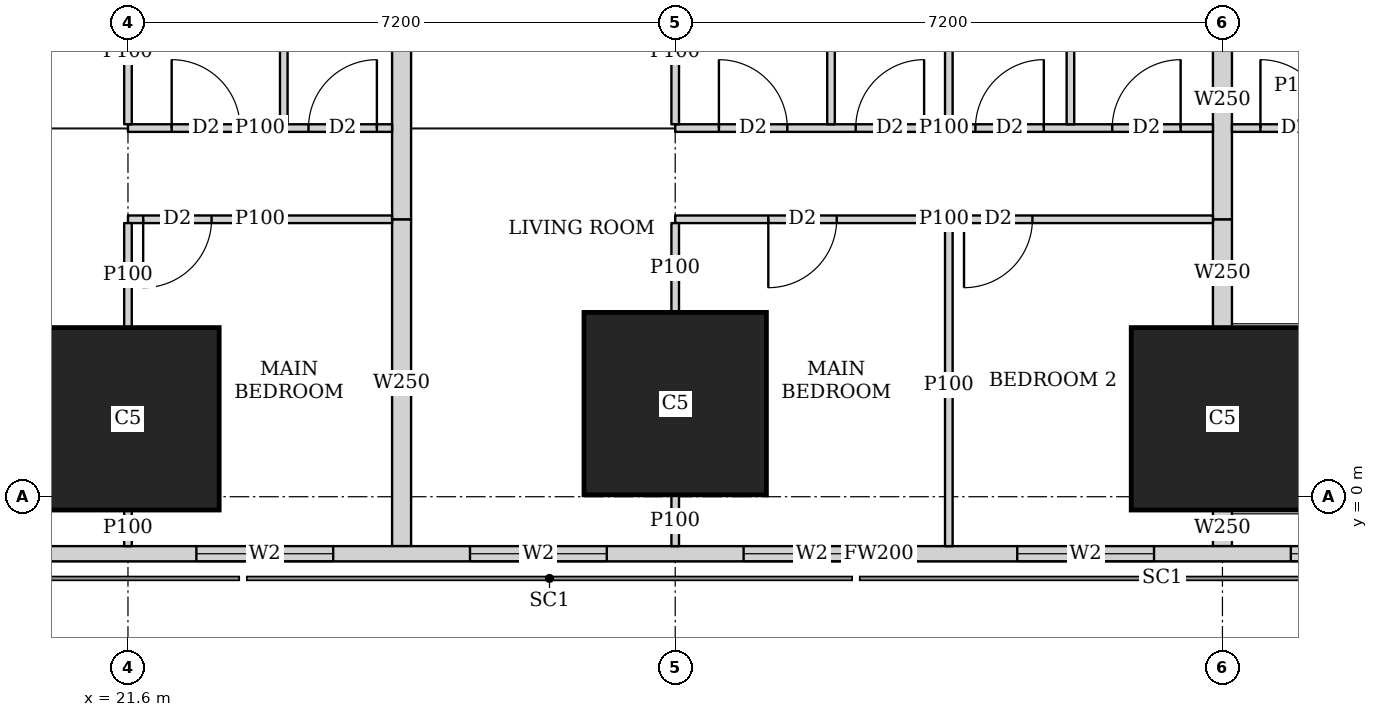
"""IFC4 building model, lengths in metres.
Left out: names, types, materials, properties, quantities, classifications, styles, units other than length and angle.
Written with IfcOpenShell. Run it as: python <this file> out.ifc"""

import sys

from ifc_helpers import new_model, si_unit, direction, frame, frame_2d, origin, origin_2d, place, context, subcontext, project, spatial, rectangle, extrude, element, fill, save


model = new_model("IFC4")
c1 = context("Model", 3, precision=1e-05, world=origin(), true_north=direction((0.0, 1.0)))
c2 = subcontext(c1, "Body", "Model", "MODEL_VIEW")
j1 = project(units=[si_unit("LENGTHUNIT", "METRE"), si_unit("PLANEANGLEUNIT", "RADIAN")], contexts=[c1])
p1 = place(None, origin())
s1 = spatial("IfcSite", under=j1, at=p1, CompositionType="ELEMENT")
p2 = place(p1, origin())
s2 = spatial("IfcBuilding", under=s1, at=p2, CompositionType="ELEMENT")
p3 = place(p2, frame((0.0, 0.0, 227.45)))
s3 = spatial("IfcBuildingStorey", under=s2, at=p3, CompositionType="ELEMENT", Elevation=227.45)
for number, where, z_axis, x_axis in (
    (1, (21.6, 1.025, 0.0), (0.0, 0.0, 1.0), (1.0, 0.0, 0.0)),
    (2, (28.8, 1.225, 0.0), (0.0, 0.0, 1.0), (1.0, 0.0, 0.0)),
    (3, (36.0, 1.025, 0.0), (0.0, 0.0, 1.0), (1.0, 0.0, 0.0)),
):
    element("IfcColumn", number, at=place(p3, frame(where, z_axis=z_axis, x_axis=x_axis)), inside=s3, PredefinedType="COLUMN", context=c2, shape_type="SweptSolid", body=[
        extrude(rectangle(XDim=2.4, YDim=2.4, at=origin_2d()), origin(), (0.0, 0.0, 1.0), 3.75),
    ])
p4 = place(p3, frame((14.563, -0.75, 0.0), z_axis=(0.0, 0.0, 1.0), x_axis=(1.0, 0.0, 0.0)))
e4 = element("IfcWall", 4, at=p4, inside=s3, PredefinedType="SOLIDWALL", context=c2, shape_type="SweptSolid", body=[
    extrude(rectangle(XDim=33.228, YDim=0.2, at=frame_2d((16.614, 0.0))), origin(), (0.0, 0.0, 1.0), 3.5),
])
p5 = place(p4, frame((2.319, 0.0, 0.9)))
e5 = element("IfcOpeningElement", 5, at=p5, cuts=e4, PredefinedType="OPENING", context=c2, shape_type="SweptSolid", body=[
    extrude(rectangle(XDim=2.4, YDim=1.5, at=frame_2d((1.2, 0.75))), frame((0.0, 0.11, 0.0), z_axis=(0.0, -1.0, 0.0), x_axis=(1.0, 0.0, 0.0)), (0.0, 0.0, 1.0), 0.22),
])
p6 = place(p4, frame((7.937, 0.0, 0.9)))
e6 = element("IfcOpeningElement", 6, at=p6, cuts=e4, PredefinedType="OPENING", context=c2, shape_type="SweptSolid", body=[
    extrude(rectangle(XDim=1.8, YDim=1.5, at=frame_2d((0.9, 0.75))), frame((0.0, 0.11, 0.0), z_axis=(0.0, -1.0, 0.0), x_axis=(1.0, 0.0, 0.0)), (0.0, 0.0, 1.0), 0.22),
])
p7 = place(p4, frame((11.537, 0.0, 0.9)))
e7 = element("IfcOpeningElement", 7, at=p7, cuts=e4, PredefinedType="OPENING", context=c2, shape_type="SweptSolid", body=[
    extrude(rectangle(XDim=1.8, YDim=1.5, at=frame_2d((0.9, 0.75))), frame((0.0, 0.11, 0.0), z_axis=(0.0, -1.0, 0.0), x_axis=(1.0, 0.0, 0.0)), (0.0, 0.0, 1.0), 0.22),
])
p8 = place(p4, frame((15.137, 0.0, 0.9)))
e8 = element("IfcOpeningElement", 8, at=p8, cuts=e4, PredefinedType="OPENING", context=c2, shape_type="SweptSolid", body=[
    extrude(rectangle(XDim=1.8, YDim=1.5, at=frame_2d((0.9, 0.75))), frame((0.0, 0.11, 0.0), z_axis=(0.0, -1.0, 0.0), x_axis=(1.0, 0.0, 0.0)), (0.0, 0.0, 1.0), 0.22),
])
p9 = place(p4, frame((18.737, 0.0, 0.9)))
e9 = element("IfcOpeningElement", 9, at=p9, cuts=e4, PredefinedType="OPENING", context=c2, shape_type="SweptSolid", body=[
    extrude(rectangle(XDim=1.8, YDim=1.5, at=frame_2d((0.9, 0.75))), frame((0.0, 0.11, 0.0), z_axis=(0.0, -1.0, 0.0), x_axis=(1.0, 0.0, 0.0)), (0.0, 0.0, 1.0), 0.22),
])
p10 = place(p4, frame((22.337, 0.0, 0.9)))
e10 = element("IfcOpeningElement", 10, at=p10, cuts=e4, PredefinedType="OPENING", context=c2, shape_type="SweptSolid", body=[
    extrude(rectangle(XDim=1.8, YDim=1.5, at=frame_2d((0.9, 0.75))), frame((0.0, 0.11, 0.0), z_axis=(0.0, -1.0, 0.0), x_axis=(1.0, 0.0, 0.0)), (0.0, 0.0, 1.0), 0.22),
])
p11 = place(p3, frame((33.68, 42.723, 0.0), z_axis=(0.0, 0.0, 1.0), x_axis=(0.185601160014, -0.982625162207, 0.0)))
e11 = element("IfcWall", 11, at=p11, inside=s3, PredefinedType="SOLIDWALL", context=c2, shape_type="SweptSolid", body=[
    extrude(rectangle(XDim=41.051, YDim=0.15, at=frame_2d((20.526, 0.0))), origin(), (0.0, 0.0, 1.0), 2.5),
])
p12 = place(p11, frame((16.123, 0.0, 0.0)))
e12 = element("IfcOpeningElement", 12, at=p12, cuts=e11, PredefinedType="OPENING", context=c2, shape_type="SweptSolid", body=[
    extrude(rectangle(XDim=1.0, YDim=2.1, at=frame_2d((0.5, 1.05))), frame((0.0, 0.085, 0.0), z_axis=(0.0, -1.0, 0.0), x_axis=(1.0, 0.0, 0.0)), (0.0, 0.0, 1.0), 0.17),
])
p13 = place(p11, frame((19.938, 0.0, 0.0)))
e13 = element("IfcOpeningElement", 13, at=p13, cuts=e11, PredefinedType="OPENING", context=c2, shape_type="SweptSolid", body=[
    extrude(rectangle(XDim=1.0, YDim=2.1, at=frame_2d((0.5, 1.05))), frame((0.0, 0.085, 0.0), z_axis=(0.0, -1.0, 0.0), x_axis=(1.0, 0.0, 0.0)), (0.0, 0.0, 1.0), 0.17),
])
p14 = place(p11, frame((30.902, 0.0, 0.0)))
e14 = element("IfcOpeningElement", 14, at=p14, cuts=e11, PredefinedType="OPENING", context=c2, shape_type="SweptSolid", body=[
    extrude(rectangle(XDim=1.0, YDim=2.1, at=frame_2d((0.5, 1.05))), frame((0.0, 0.085, 0.0), z_axis=(0.0, -1.0, 0.0), x_axis=(1.0, 0.0, 0.0)), (0.0, 0.0, 1.0), 0.17),
])
p15 = place(p3, frame((25.075, 3.65, 0.0), z_axis=(0.0, 0.0, 1.0), x_axis=(-1.0, 0.0, 0.0)))
e15 = element("IfcWall", 15, at=p15, inside=s3, PredefinedType="PARTITIONING", context=c2, shape_type="SweptSolid", body=[
    extrude(rectangle(XDim=3.475, YDim=0.1, at=frame_2d((1.737, 0.0))), origin(), (0.0, 0.0, 1.0), 3.5),
])
p16 = place(p15, frame((2.375, 0.0, 0.0)))
e16 = element("IfcOpeningElement", 16, at=p16, cuts=e15, PredefinedType="OPENING", context=c2, shape_type="SweptSolid", body=[
    extrude(rectangle(XDim=0.9, YDim=2.1, at=frame_2d((0.45, 1.05))), frame((0.0, 0.06, 0.0), z_axis=(0.0, -1.0, 0.0), x_axis=(1.0, 0.0, 0.0)), (0.0, 0.0, 1.0), 0.12),
])
p17 = place(p3, frame((25.075, 4.85, 0.0), z_axis=(0.0, 0.0, 1.0), x_axis=(-1.0, 0.0, 0.0)))
e17 = element("IfcWall", 17, at=p17, inside=s3, PredefinedType="PARTITIONING", context=c2, shape_type="SweptSolid", body=[
    extrude(rectangle(XDim=3.475, YDim=0.1, at=frame_2d((1.737, 0.0))), origin(), (0.0, 0.0, 1.0), 3.5),
])
p18 = place(p17, frame((2.0, 0.0, 0.0)))
e18 = element("IfcOpeningElement", 18, at=p18, cuts=e17, PredefinedType="OPENING", context=c2, shape_type="SweptSolid", body=[
    extrude(rectangle(XDim=0.9, YDim=2.1, at=frame_2d((0.45, 1.05))), frame((0.0, 0.06, 0.0), z_axis=(0.0, -1.0, 0.0), x_axis=(1.0, 0.0, 0.0)), (0.0, 0.0, 1.0), 0.12),
])
p19 = place(p17, frame((0.2, 0.0, 0.0)))
e19 = element("IfcOpeningElement", 19, at=p19, cuts=e17, PredefinedType="OPENING", context=c2, shape_type="SweptSolid", body=[
    extrude(rectangle(XDim=0.9, YDim=2.1, at=frame_2d((0.45, 1.05))), frame((0.0, 0.06, 0.0), z_axis=(0.0, -1.0, 0.0), x_axis=(1.0, 0.0, 0.0)), (0.0, 0.0, 1.0), 0.12),
])
p20 = place(p3, frame((21.6, -0.65, 0.0), z_axis=(0.0, 0.0, 1.0), x_axis=(0.0, 1.0, 0.0)))
e20 = element("IfcWall", 20, at=p20, inside=s3, PredefinedType="PARTITIONING", context=c2, shape_type="SweptSolid", body=[
    extrude(rectangle(XDim=0.474, YDim=0.1, at=frame_2d((0.237, 0.0))), origin(), (0.0, 0.0, 1.0), 3.5),
])
p21 = place(p3, frame((21.6, 2.226, 0.0), z_axis=(0.0, 0.0, 1.0), x_axis=(0.0, 1.0, 0.0)))
e21 = element("IfcWall", 21, at=p21, inside=s3, PredefinedType="PARTITIONING", context=c2, shape_type="SweptSolid", body=[
    extrude(rectangle(XDim=1.374, YDim=0.1, at=frame_2d((0.687, 0.0))), origin(), (0.0, 0.0, 1.0), 3.5),
])
p22 = place(p3, frame((21.6, 4.9, 0.0), z_axis=(0.0, 0.0, 1.0), x_axis=(0.0, 1.0, 0.0)))
e22 = element("IfcWall", 22, at=p22, inside=s3, PredefinedType="PARTITIONING", context=c2, shape_type="SweptSolid", body=[
    extrude(rectangle(XDim=1.899, YDim=0.1, at=frame_2d((0.95, 0.0))), origin(), (0.0, 0.0, 1.0), 3.5),
])
p23 = place(p3, frame((23.65, 4.9, 0.0), z_axis=(0.0, 0.0, 1.0), x_axis=(0.0, 1.0, 0.0)))
e23 = element("IfcWall", 23, at=p23, inside=s3, PredefinedType="PARTITIONING", context=c2, shape_type="SweptSolid", body=[
    extrude(rectangle(XDim=3.525, YDim=0.1, at=frame_2d((1.763, 0.0))), origin(), (0.0, 0.0, 1.0), 3.5),
])
p24 = place(p3, frame((35.875, 3.65, 0.0), z_axis=(0.0, 0.0, 1.0), x_axis=(-1.0, 0.0, 0.0)))
e24 = element("IfcWall", 24, at=p24, inside=s3, PredefinedType="PARTITIONING", context=c2, shape_type="SweptSolid", body=[
    extrude(rectangle(XDim=7.075, YDim=0.1, at=frame_2d((3.538, 0.0))), origin(), (0.0, 0.0, 1.0), 3.5),
])
p25 = place(p24, frame((4.95, 0.0, 0.0)))
e25 = element("IfcOpeningElement", 25, at=p25, cuts=e24, PredefinedType="OPENING", context=c2, shape_type="SweptSolid", body=[
    extrude(rectangle(XDim=0.9, YDim=2.1, at=frame_2d((0.45, 1.05))), frame((0.0, 0.06, 0.0), z_axis=(0.0, -1.0, 0.0), x_axis=(1.0, 0.0, 0.0)), (0.0, 0.0, 1.0), 0.12),
])
p26 = place(p24, frame((2.375, 0.0, 0.0)))
e26 = element("IfcOpeningElement", 26, at=p26, cuts=e24, PredefinedType="OPENING", context=c2, shape_type="SweptSolid", body=[
    extrude(rectangle(XDim=0.9, YDim=2.1, at=frame_2d((0.45, 1.05))), frame((0.0, 0.06, 0.0), z_axis=(0.0, -1.0, 0.0), x_axis=(1.0, 0.0, 0.0)), (0.0, 0.0, 1.0), 0.12),
])
p27 = place(p3, frame((35.875, 4.85, 0.0), z_axis=(0.0, 0.0, 1.0), x_axis=(-1.0, 0.0, 0.0)))
e27 = element("IfcWall", 27, at=p27, inside=s3, PredefinedType="PARTITIONING", context=c2, shape_type="SweptSolid", body=[
    extrude(rectangle(XDim=7.075, YDim=0.1, at=frame_2d((3.538, 0.0))), origin(), (0.0, 0.0, 1.0), 3.5),
])
p28 = place(p27, frame((5.6, 0.0, 0.0)))
e28 = element("IfcOpeningElement", 28, at=p28, cuts=e27, PredefinedType="OPENING", context=c2, shape_type="SweptSolid", body=[
    extrude(rectangle(XDim=0.9, YDim=2.1, at=frame_2d((0.45, 1.05))), frame((0.0, 0.06, 0.0), z_axis=(0.0, -1.0, 0.0), x_axis=(1.0, 0.0, 0.0)), (0.0, 0.0, 1.0), 0.12),
])
p29 = place(p27, frame((2.225, 0.0, 0.0)))
e29 = element("IfcOpeningElement", 29, at=p29, cuts=e27, PredefinedType="OPENING", context=c2, shape_type="SweptSolid", body=[
    extrude(rectangle(XDim=0.9, YDim=2.1, at=frame_2d((0.45, 1.05))), frame((0.0, 0.06, 0.0), z_axis=(0.0, -1.0, 0.0), x_axis=(1.0, 0.0, 0.0)), (0.0, 0.0, 1.0), 0.12),
])
p30 = place(p27, frame((3.8, 0.0, 0.0)))
e30 = element("IfcOpeningElement", 30, at=p30, cuts=e27, PredefinedType="OPENING", context=c2, shape_type="SweptSolid", body=[
    extrude(rectangle(XDim=0.9, YDim=2.1, at=frame_2d((0.45, 1.05))), frame((0.0, 0.06, 0.0), z_axis=(0.0, -1.0, 0.0), x_axis=(1.0, 0.0, 0.0)), (0.0, 0.0, 1.0), 0.12),
])
p31 = place(p27, frame((0.425, 0.0, 0.0)))
e31 = element("IfcOpeningElement", 31, at=p31, cuts=e27, PredefinedType="OPENING", context=c2, shape_type="SweptSolid", body=[
    extrude(rectangle(XDim=0.9, YDim=2.1, at=frame_2d((0.45, 1.05))), frame((0.0, 0.06, 0.0), z_axis=(0.0, -1.0, 0.0), x_axis=(1.0, 0.0, 0.0)), (0.0, 0.0, 1.0), 0.12),
])
p32 = place(p3, frame((28.8, -0.65, 0.0), z_axis=(0.0, 0.0, 1.0), x_axis=(0.0, 1.0, 0.0)))
e32 = element("IfcWall", 32, at=p32, inside=s3, PredefinedType="PARTITIONING", context=c2, shape_type="SweptSolid", body=[
    extrude(rectangle(XDim=0.674, YDim=0.1, at=frame_2d((0.337, 0.0))), origin(), (0.0, 0.0, 1.0), 3.5),
])
p33 = place(p3, frame((28.8, 2.426, 0.0), z_axis=(0.0, 0.0, 1.0), x_axis=(0.0, 1.0, 0.0)))
e33 = element("IfcWall", 33, at=p33, inside=s3, PredefinedType="PARTITIONING", context=c2, shape_type="SweptSolid", body=[
    extrude(rectangle(XDim=1.174, YDim=0.1, at=frame_2d((0.587, 0.0))), origin(), (0.0, 0.0, 1.0), 3.5),
])
p34 = place(p3, frame((32.4, -0.65, 0.0), z_axis=(0.0, 0.0, 1.0), x_axis=(0.0, 1.0, 0.0)))
e34 = element("IfcWall", 34, at=p34, inside=s3, PredefinedType="PARTITIONING", context=c2, shape_type="SweptSolid", body=[
    extrude(rectangle(XDim=4.25, YDim=0.1, at=frame_2d((2.125, 0.0))), origin(), (0.0, 0.0, 1.0), 2.05),
])
p35 = place(p3, frame((28.8, 4.9, 0.0), z_axis=(0.0, 0.0, 1.0), x_axis=(0.0, 1.0, 0.0)))
e35 = element("IfcWall", 35, at=p35, inside=s3, PredefinedType="PARTITIONING", context=c2, shape_type="SweptSolid", body=[
    extrude(rectangle(XDim=1.899, YDim=0.1, at=frame_2d((0.95, 0.0))), origin(), (0.0, 0.0, 1.0), 3.5),
])
for number, where, z_axis, x_axis in (
    (36, (32.4, 4.9, 0.0), (0.0, 0.0, 1.0), (0.0, 1.0, 0.0)),
    (37, (30.85, 4.9, 0.0), (0.0, 0.0, 1.0), (0.0, 1.0, 0.0)),
    (38, (34.0, 4.9, 0.0), (0.0, 0.0, 1.0), (0.0, 1.0, 0.0)),
):
    element("IfcWall", number, at=place(p3, frame(where, z_axis=z_axis, x_axis=x_axis)), inside=s3, PredefinedType="PARTITIONING", context=c2, shape_type="SweptSolid", body=[
        extrude(rectangle(XDim=3.525, YDim=0.1, at=frame_2d((1.763, 0.0))), origin(), (0.0, 0.0, 1.0), 3.5),
    ])
p36 = place(p3, frame((25.2, -0.65, 0.0), z_axis=(0.0, 0.0, 1.0), x_axis=(0.0, 1.0, 0.0)))
e39 = element("IfcWall", 39, at=p36, inside=s3, PredefinedType="SOLIDWALL", context=c2, shape_type="SweptSolid", body=[
    extrude(rectangle(XDim=4.3, YDim=0.25, at=frame_2d((2.15, 0.0))), origin(), (0.0, 0.0, 1.0), 2.05),
])
p37 = place(p3, frame((25.2, 3.65, 0.0), z_axis=(0.0, 0.0, 1.0), x_axis=(0.0, 1.0, 0.0)))
e40 = element("IfcWall", 40, at=p37, inside=s3, PredefinedType="SOLIDWALL", context=c2, shape_type="SweptSolid", body=[
    extrude(rectangle(XDim=4.775, YDim=0.25, at=frame_2d((2.388, 0.0))), origin(), (0.0, 0.0, 1.0), 3.5),
])
p38 = place(p3, frame((37.89, 4.85, 0.0), z_axis=(0.0, 0.0, 1.0), x_axis=(-1.0, 0.0, 0.0)))
e41 = element("IfcWall", 41, at=p38, inside=s3, PredefinedType="PARTITIONING", context=c2, shape_type="SweptSolid", body=[
    extrude(rectangle(XDim=1.765, YDim=0.1, at=frame_2d((0.882, 0.0))), origin(), (0.0, 0.0, 1.0), 3.5),
])
p39 = place(p38, frame((0.49, 0.0, 0.0)))
e42 = element("IfcOpeningElement", 42, at=p39, cuts=e41, PredefinedType="OPENING", context=c2, shape_type="SweptSolid", body=[
    extrude(rectangle(XDim=0.9, YDim=2.1, at=frame_2d((0.45, 1.05))), frame((0.0, 0.06, 0.0), z_axis=(0.0, -1.0, 0.0), x_axis=(1.0, 0.0, 0.0)), (0.0, 0.0, 1.0), 0.12),
])
p40 = place(p3, frame((36.0, -0.65, 0.0), z_axis=(0.0, 0.0, 1.0), x_axis=(0.0, 1.0, 0.0)))
e43 = element("IfcWall", 43, at=p40, inside=s3, PredefinedType="SOLIDWALL", context=c2, shape_type="SweptSolid", body=[
    extrude(rectangle(XDim=0.474, YDim=0.25, at=frame_2d((0.237, 0.0))), origin(), (0.0, 0.0, 1.0), 2.05),
])
p41 = place(p3, frame((36.0, 2.226, 0.0), z_axis=(0.0, 0.0, 1.0), x_axis=(0.0, 1.0, 0.0)))
e44 = element("IfcWall", 44, at=p41, inside=s3, PredefinedType="SOLIDWALL", context=c2, shape_type="SweptSolid", body=[
    extrude(rectangle(XDim=1.424, YDim=0.25, at=frame_2d((0.712, 0.0))), origin(), (0.0, 0.0, 1.0), 2.05),
])
p42 = place(p3, frame((36.0, 3.65, 0.0), z_axis=(0.0, 0.0, 1.0), x_axis=(0.0, 1.0, 0.0)))
e45 = element("IfcWall", 45, at=p42, inside=s3, PredefinedType="SOLIDWALL", context=c2, shape_type="SweptSolid", body=[
    extrude(rectangle(XDim=3.149, YDim=0.25, at=frame_2d((1.575, 0.0))), origin(), (0.0, 0.0, 1.0), 3.5),
])
p43 = place(p6, origin())
e46 = element("IfcWindow", 46, at=p43, inside=s3, PartitioningType="SINGLE_PANEL", PredefinedType="WINDOW", context=c2, shape_type="SweptSolid", body=[
    extrude(rectangle(XDim=1.8, YDim=1.5, at=frame_2d((0.9, 0.75))), frame((0.0, 0.03, 0.0), z_axis=(0.0, -1.0, 0.0), x_axis=(1.0, 0.0, 0.0)), (0.0, 0.0, 1.0), 0.06),
])
fill(e6, e46)
p44 = place(p7, origin())
e47 = element("IfcWindow", 47, at=p44, inside=s3, PartitioningType="SINGLE_PANEL", PredefinedType="WINDOW", context=c2, shape_type="SweptSolid", body=[
    extrude(rectangle(XDim=1.8, YDim=1.5, at=frame_2d((0.9, 0.75))), frame((0.0, 0.03, 0.0), z_axis=(0.0, -1.0, 0.0), x_axis=(1.0, 0.0, 0.0)), (0.0, 0.0, 1.0), 0.06),
])
fill(e7, e47)
p45 = place(p8, origin())
e48 = element("IfcWindow", 48, at=p45, inside=s3, PartitioningType="SINGLE_PANEL", PredefinedType="WINDOW", context=c2, shape_type="SweptSolid", body=[
    extrude(rectangle(XDim=1.8, YDim=1.5, at=frame_2d((0.9, 0.75))), frame((0.0, 0.03, 0.0), z_axis=(0.0, -1.0, 0.0), x_axis=(1.0, 0.0, 0.0)), (0.0, 0.0, 1.0), 0.06),
])
fill(e8, e48)
p46 = place(p9, origin())
e49 = element("IfcWindow", 49, at=p46, inside=s3, PartitioningType="SINGLE_PANEL", PredefinedType="WINDOW", context=c2, shape_type="SweptSolid", body=[
    extrude(rectangle(XDim=1.8, YDim=1.5, at=frame_2d((0.9, 0.75))), frame((0.0, 0.03, 0.0), z_axis=(0.0, -1.0, 0.0), x_axis=(1.0, 0.0, 0.0)), (0.0, 0.0, 1.0), 0.06),
])
fill(e9, e49)
p47 = place(p10, origin())
e50 = element("IfcWindow", 50, at=p47, inside=s3, PartitioningType="SINGLE_PANEL", PredefinedType="WINDOW", context=c2, shape_type="SweptSolid", body=[
    extrude(rectangle(XDim=1.8, YDim=1.5, at=frame_2d((0.9, 0.75))), frame((0.0, 0.03, 0.0), z_axis=(0.0, -1.0, 0.0), x_axis=(1.0, 0.0, 0.0)), (0.0, 0.0, 1.0), 0.06),
])
fill(e10, e50)
p48 = place(p16, origin())
e51 = element("IfcDoor", 51, at=p48, inside=s3, OperationType="SINGLE_SWING_RIGHT", PredefinedType="DOOR", context=c2, shape_type="SweptSolid", body=[
    extrude(rectangle(XDim=0.9, YDim=2.1, at=frame_2d((0.45, 1.05))), frame((0.0, 0.025, 0.0), z_axis=(0.0, -1.0, 0.0), x_axis=(1.0, 0.0, 0.0)), (0.0, 0.0, 1.0), 0.05),
])
fill(e16, e51)
p49 = place(p18, origin())
e52 = element("IfcDoor", 52, at=p49, inside=s3, OperationType="SINGLE_SWING_LEFT", PredefinedType="DOOR", context=c2, shape_type="SweptSolid", body=[
    extrude(rectangle(XDim=0.9, YDim=2.1, at=frame_2d((0.45, 1.05))), frame((0.0, 0.025, 0.0), z_axis=(0.0, -1.0, 0.0), x_axis=(1.0, 0.0, 0.0)), (0.0, 0.0, 1.0), 0.05),
])
fill(e18, e52)
p50 = place(p19, origin())
e53 = element("IfcDoor", 53, at=p50, inside=s3, OperationType="SINGLE_SWING_RIGHT", PredefinedType="DOOR", context=c2, shape_type="SweptSolid", body=[
    extrude(rectangle(XDim=0.9, YDim=2.1, at=frame_2d((0.45, 1.05))), frame((0.0, 0.025, 0.0), z_axis=(0.0, -1.0, 0.0), x_axis=(1.0, 0.0, 0.0)), (0.0, 0.0, 1.0), 0.05),
])
fill(e19, e53)
p51 = place(p25, origin())
e54 = element("IfcDoor", 54, at=p51, inside=s3, OperationType="SINGLE_SWING_RIGHT", PredefinedType="DOOR", context=c2, shape_type="SweptSolid", body=[
    extrude(rectangle(XDim=0.9, YDim=2.1, at=frame_2d((0.45, 1.05))), frame((0.0, 0.025, 0.0), z_axis=(0.0, -1.0, 0.0), x_axis=(1.0, 0.0, 0.0)), (0.0, 0.0, 1.0), 0.05),
])
fill(e25, e54)
p52 = place(p26, origin())
e55 = element("IfcDoor", 55, at=p52, inside=s3, OperationType="SINGLE_SWING_RIGHT", PredefinedType="DOOR", context=c2, shape_type="SweptSolid", body=[
    extrude(rectangle(XDim=0.9, YDim=2.1, at=frame_2d((0.45, 1.05))), frame((0.0, 0.025, 0.0), z_axis=(0.0, -1.0, 0.0), x_axis=(1.0, 0.0, 0.0)), (0.0, 0.0, 1.0), 0.05),
])
fill(e26, e55)
p53 = place(p28, origin())
e56 = element("IfcDoor", 56, at=p53, inside=s3, OperationType="SINGLE_SWING_LEFT", PredefinedType="DOOR", context=c2, shape_type="SweptSolid", body=[
    extrude(rectangle(XDim=0.9, YDim=2.1, at=frame_2d((0.45, 1.05))), frame((0.0, 0.025, 0.0), z_axis=(0.0, -1.0, 0.0), x_axis=(1.0, 0.0, 0.0)), (0.0, 0.0, 1.0), 0.05),
])
fill(e28, e56)
p54 = place(p29, origin())
e57 = element("IfcDoor", 57, at=p54, inside=s3, OperationType="SINGLE_SWING_RIGHT", PredefinedType="DOOR", context=c2, shape_type="SweptSolid", body=[
    extrude(rectangle(XDim=0.9, YDim=2.1, at=frame_2d((0.45, 1.05))), frame((0.0, 0.025, 0.0), z_axis=(0.0, -1.0, 0.0), x_axis=(1.0, 0.0, 0.0)), (0.0, 0.0, 1.0), 0.05),
])
fill(e29, e57)
p55 = place(p30, origin())
e58 = element("IfcDoor", 58, at=p55, inside=s3, OperationType="SINGLE_SWING_RIGHT", PredefinedType="DOOR", context=c2, shape_type="SweptSolid", body=[
    extrude(rectangle(XDim=0.9, YDim=2.1, at=frame_2d((0.45, 1.05))), frame((0.0, 0.025, 0.0), z_axis=(0.0, -1.0, 0.0), x_axis=(1.0, 0.0, 0.0)), (0.0, 0.0, 1.0), 0.05),
])
fill(e30, e58)
p56 = place(p31, origin())
e59 = element("IfcDoor", 59, at=p56, inside=s3, OperationType="SINGLE_SWING_RIGHT", PredefinedType="DOOR", context=c2, shape_type="SweptSolid", body=[
    extrude(rectangle(XDim=0.9, YDim=2.1, at=frame_2d((0.45, 1.05))), frame((0.0, 0.025, 0.0), z_axis=(0.0, -1.0, 0.0), x_axis=(1.0, 0.0, 0.0)), (0.0, 0.0, 1.0), 0.05),
])
fill(e31, e59)
p57 = place(p39, origin())
e60 = element("IfcDoor", 60, at=p57, inside=s3, OperationType="SINGLE_SWING_LEFT", PredefinedType="DOOR", context=c2, shape_type="SweptSolid", body=[
    extrude(rectangle(XDim=0.9, YDim=2.1, at=frame_2d((0.45, 1.05))), frame((0.0, 0.025, 0.0), z_axis=(0.0, -1.0, 0.0), x_axis=(1.0, 0.0, 0.0)), (0.0, 0.0, 1.0), 0.05),
])
fill(e42, e60)
save(model, sys.argv[1])
